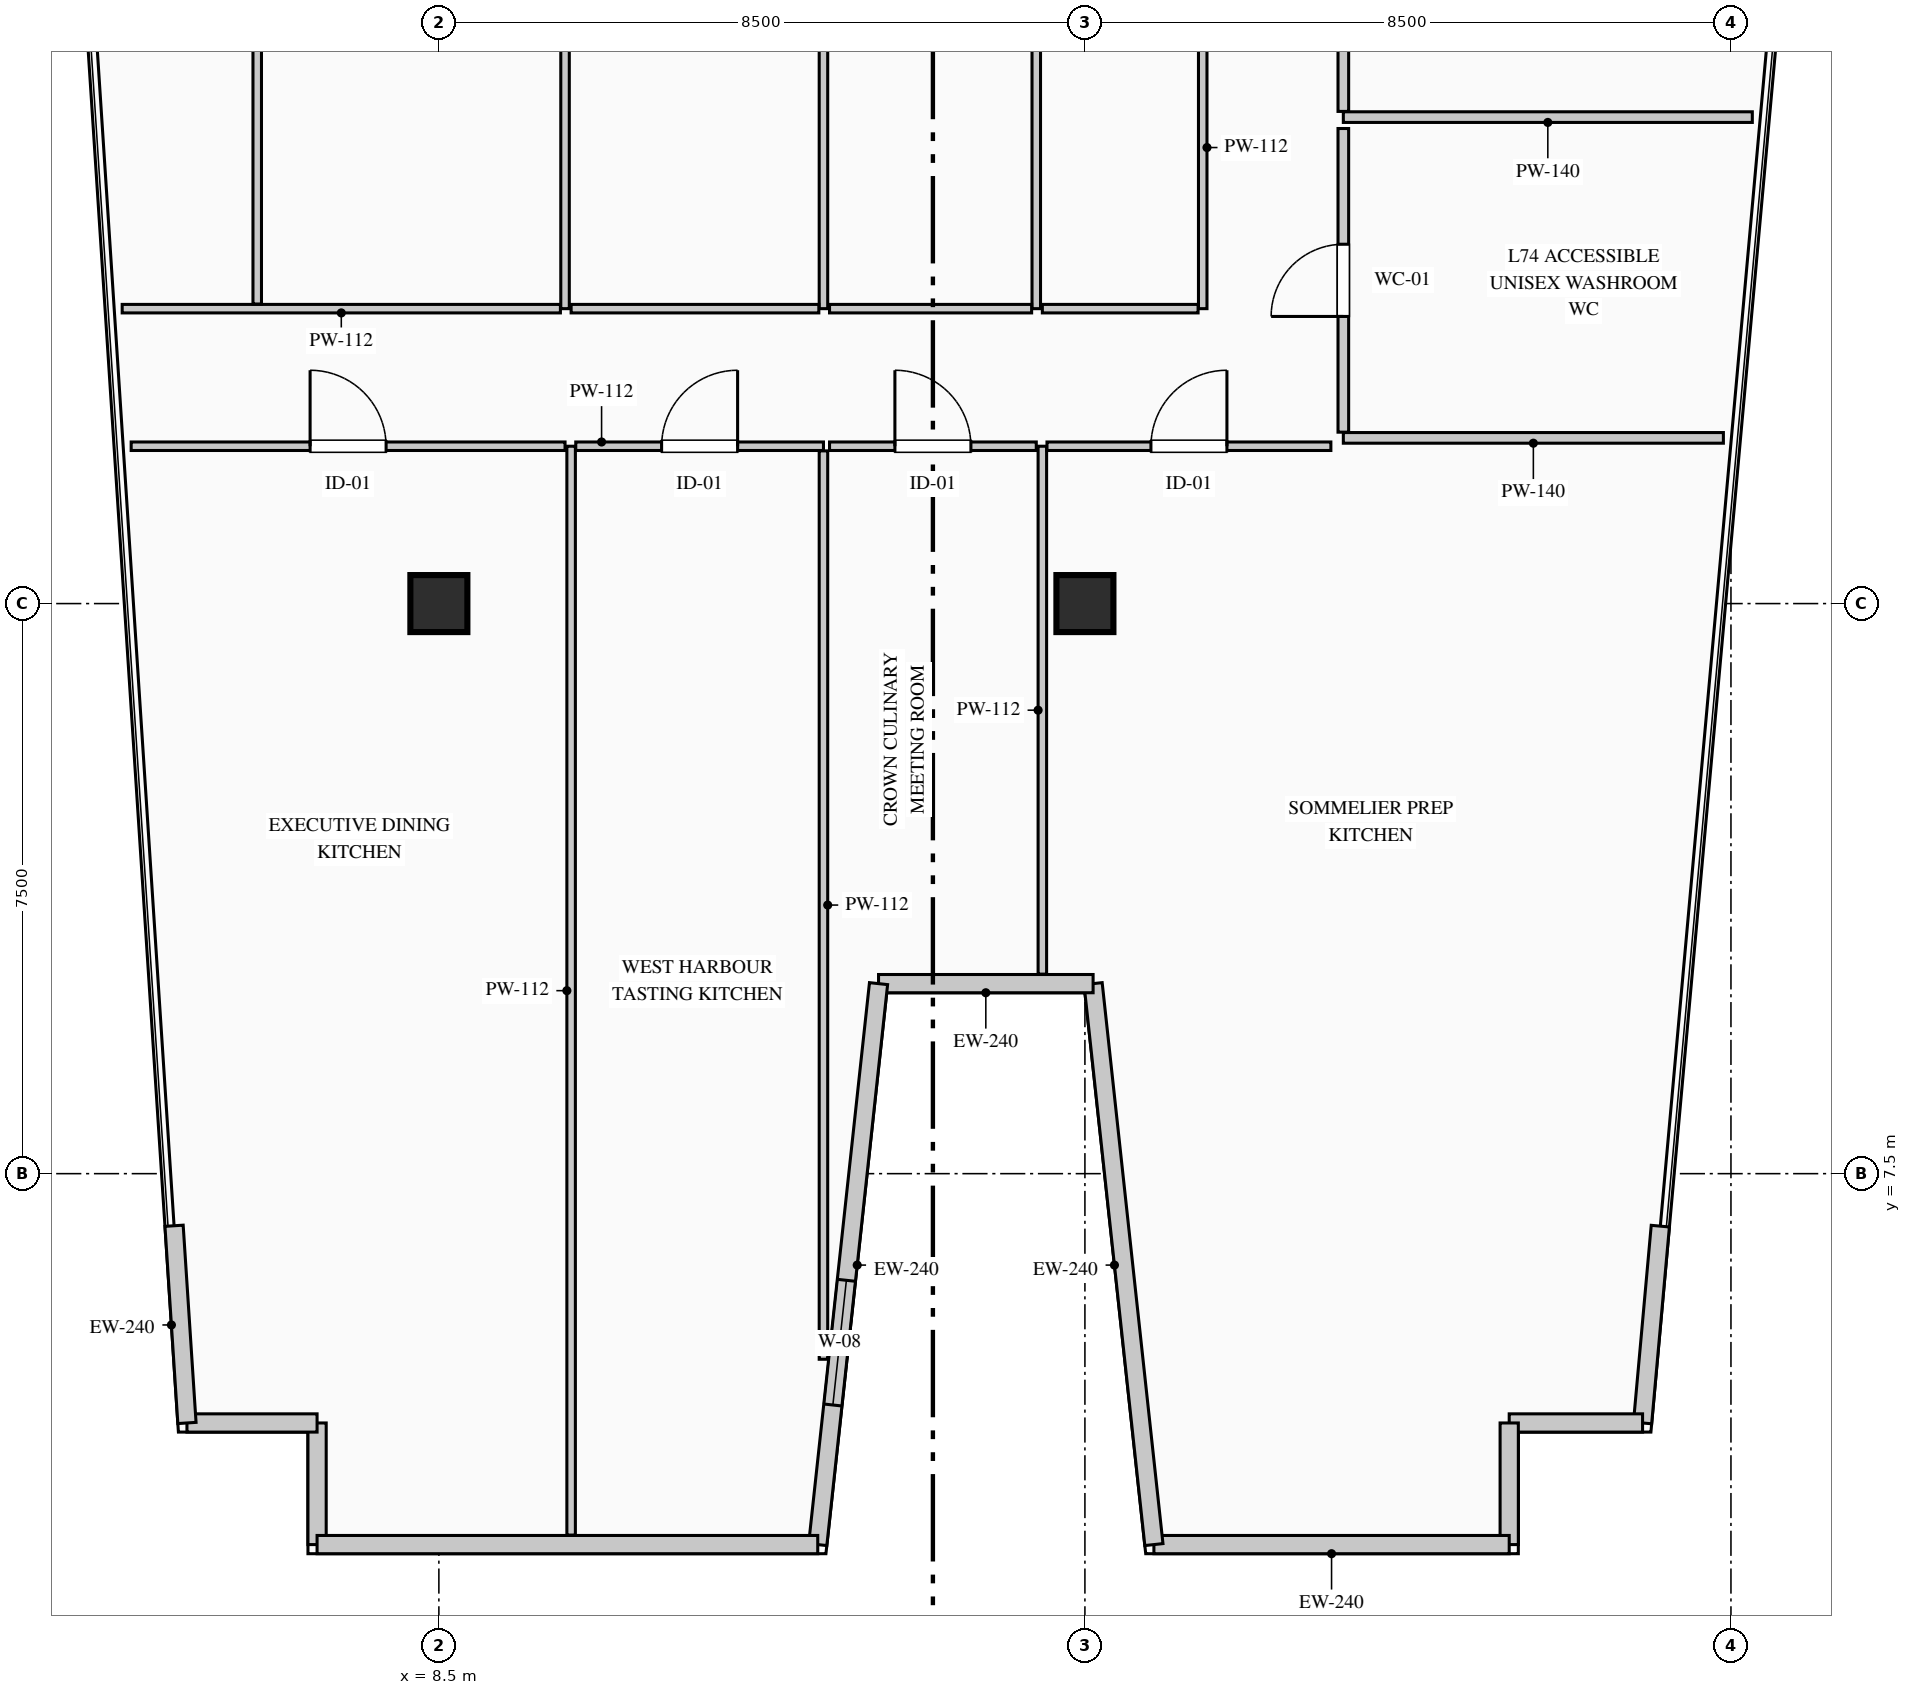
"""IFC4 building model, lengths in metres.
Left out: names, types, materials, properties, quantities, classifications, styles, units other than length and angle.
Written with IfcOpenShell. Run it as: python <this file> out.ifc"""

import sys

from ifc_helpers import new_model, si_unit, direction, frame, frame_2d, origin, origin_2d, place, context, subcontext, project, spatial, rectangle, extrude, element, fill, save


model = new_model("IFC4")
c1 = context("Model", 3, precision=1e-05, world=origin(), true_north=direction((0.0, 1.0)))
c2 = subcontext(c1, "Body", "Model", "MODEL_VIEW")
j1 = project(units=[si_unit("LENGTHUNIT", "METRE"), si_unit("PLANEANGLEUNIT", "RADIAN")], contexts=[c1])
p1 = place(None, origin())
s1 = spatial("IfcSite", under=j1, at=p1, CompositionType="ELEMENT")
p2 = place(p1, origin())
s2 = spatial("IfcBuilding", under=s1, at=p2, CompositionType="ELEMENT")
p3 = place(p2, frame((0.0, 0.0, 308.05)))
s3 = spatial("IfcBuildingStorey", under=s2, at=p3, CompositionType="ELEMENT", Elevation=308.05)
for number, where, z_axis, x_axis in (
    (1, (8.5, 15.0, 0.0), (0.0, 0.0, 1.0), (1.0, 0.0, 0.0)),
    (2, (17.0, 15.0, 0.0), (0.0, 0.0, 1.0), (1.0, 0.0, 0.0)),
):
    element("IfcColumn", number, at=place(p3, frame(where, z_axis=z_axis, x_axis=x_axis)), inside=s3, PredefinedType="COLUMN", context=c2, shape_type="SweptSolid", body=[
        extrude(rectangle(XDim=0.75, YDim=0.75, at=origin_2d()), origin(), (0.0, 0.0, 1.0), 3.95),
    ])
p4 = place(p3, frame((6.897, 2.62, 0.0), z_axis=(0.0, 0.0, 1.0), x_axis=(0.0, 1.0, 0.0)))
e3 = element("IfcWall", 3, at=p4, inside=s3, PredefinedType="STANDARD", context=c2, shape_type="SweptSolid", body=[
    extrude(rectangle(XDim=1.6, YDim=0.24, at=frame_2d((0.8, 0.0))), origin(), (0.0, 0.0, 1.0), 3.7),
])
p5 = place(p3, frame((6.897, 4.22, 0.0), z_axis=(0.0, 0.0, 1.0), x_axis=(-1.0, 0.0, 0.0)))
e4 = element("IfcWall", 4, at=p5, inside=s3, PredefinedType="STANDARD", context=c2, shape_type="SweptSolid", body=[
    extrude(rectangle(XDim=1.712, YDim=0.24, at=frame_2d((0.856, 0.0))), origin(), (0.0, 0.0, 1.0), 3.7),
])
for number, where, z_axis, x_axis in (
    (5, (5.185, 4.22, 0.0), (0.0, 0.0, 1.0), (-0.065, 0.998, 0.0)),
    (6, (24.571, 6.81, 0.0), (0.0, 0.0, 1.0), (-0.09, -0.996, 0.0)),
):
    element("IfcWall", number, at=place(p3, frame(where, z_axis=z_axis, x_axis=x_axis)), inside=s3, PredefinedType="STANDARD", context=c2, shape_type="SweptSolid", body=[
        extrude(rectangle(XDim=2.6, YDim=0.24, at=frame_2d((1.3, 0.0))), origin(), (0.0, 0.0, 1.0), 3.7),
    ])
p6 = place(p3, frame((24.337, 4.22, 0.0), z_axis=(0.0, 0.0, 1.0), x_axis=(-1.0, 0.0, 0.0)))
e7 = element("IfcWall", 7, at=p6, inside=s3, PredefinedType="STANDARD", context=c2, shape_type="SweptSolid", body=[
    extrude(rectangle(XDim=1.755, YDim=0.24, at=frame_2d((0.877, 0.0))), origin(), (0.0, 0.0, 1.0), 3.7),
])
p7 = place(p3, frame((22.583, 4.22, 0.0), z_axis=(0.0, 0.0, 1.0), x_axis=(0.0, -1.0, 0.0)))
e8 = element("IfcWall", 8, at=p7, inside=s3, PredefinedType="STANDARD", context=c2, shape_type="SweptSolid", body=[
    extrude(rectangle(XDim=1.6, YDim=0.24, at=frame_2d((0.8, 0.0))), origin(), (0.0, 0.0, 1.0), 3.7),
])
p8 = place(p3, frame((22.583, 2.62, 0.0), z_axis=(0.0, 0.0, 1.0), x_axis=(-1.0, 0.0, 0.0)))
e9 = element("IfcWall", 9, at=p8, inside=s3, PredefinedType="STANDARD", context=c2, shape_type="SweptSolid", body=[
    extrude(rectangle(XDim=4.675, YDim=0.24, at=frame_2d((2.337, 0.0))), origin(), (0.0, 0.0, 1.0), 3.7),
])
p9 = place(p3, frame((17.908, 2.62, 0.0), z_axis=(0.0, 0.0, 1.0), x_axis=(-0.107777936076, 0.994174992894, 0.0)))
e10 = element("IfcWall", 10, at=p9, inside=s3, PredefinedType="STANDARD", context=c2, shape_type="SweptSolid", body=[
    extrude(rectangle(XDim=7.423, YDim=0.24, at=frame_2d((3.711, 0.0))), origin(), (0.0, 0.0, 1.0), 3.7),
])
p10 = place(p3, frame((17.108, 10.0, 0.0), z_axis=(0.0, 0.0, 1.0), x_axis=(-1.0, 0.0, 0.0)))
e11 = element("IfcWall", 11, at=p10, inside=s3, PredefinedType="STANDARD", context=c2, shape_type="SweptSolid", body=[
    extrude(rectangle(XDim=2.823, YDim=0.24, at=frame_2d((1.411, 0.0))), origin(), (0.0, 0.0, 1.0), 3.7),
])
p11 = place(p3, frame((14.285, 10.0, 0.0), z_axis=(0.0, 0.0, 1.0), x_axis=(-0.107777936076, -0.994174992894, 0.0)))
e12 = element("IfcWall", 12, at=p11, inside=s3, PredefinedType="STANDARD", context=c2, shape_type="SweptSolid", body=[
    extrude(rectangle(XDim=7.423, YDim=0.24, at=frame_2d((3.711, 0.0))), origin(), (0.0, 0.0, 1.0), 3.7),
])
p12 = place(p11, frame((3.926, 0.0, 0.9)))
e13 = element("IfcOpeningElement", 13, at=p12, cuts=e12, PredefinedType="OPENING", context=c2, shape_type="SweptSolid", body=[
    extrude(rectangle(XDim=1.65, YDim=1.95, at=frame_2d((0.825, 0.975))), frame((0.0, 0.13, 0.0), z_axis=(0.0, -1.0, 0.0), x_axis=(1.0, 0.0, 0.0)), (0.0, 0.0, 1.0), 0.26),
])
p13 = place(p3, frame((13.485, 2.62, 0.0), z_axis=(0.0, 0.0, 1.0), x_axis=(-1.0, 0.0, 0.0)))
e14 = element("IfcWall", 14, at=p13, inside=s3, PredefinedType="STANDARD", context=c2, shape_type="SweptSolid", body=[
    extrude(rectangle(XDim=6.587, YDim=0.24, at=frame_2d((3.294, 0.0))), origin(), (0.0, 0.0, 1.0), 3.7),
])
p14 = place(p3, frame((25.781, 21.4, 0.0), z_axis=(0.0, 0.0, 1.0), x_axis=(-1.0, 0.0, 0.0)))
e15 = element("IfcWall", 15, at=p14, inside=s3, PredefinedType="PARTITIONING", context=c2, shape_type="SweptSolid", body=[
    extrude(rectangle(XDim=5.381, YDim=0.14, at=frame_2d((2.69, 0.0))), origin(), (0.0, 0.0, 1.0), 3.7),
])
p15 = place(p3, frame((20.4, 21.475, 0.0), z_axis=(0.0, 0.0, 1.0), x_axis=(0.0, 1.0, 0.0)))
e16 = element("IfcWall", 16, at=p15, inside=s3, PredefinedType="PARTITIONING", context=c2, shape_type="SweptSolid", body=[
    extrude(rectangle(XDim=3.675, YDim=0.14, at=frame_2d((1.837, 0.0))), origin(), (0.0, 0.0, 1.0), 3.7),
])
p16 = place(p15, frame((1.363, 0.0, 0.0)))
e17 = element("IfcOpeningElement", 17, at=p16, cuts=e16, PredefinedType="OPENING", context=c2, shape_type="SweptSolid", body=[
    extrude(rectangle(XDim=0.95, YDim=2.15, at=frame_2d((0.475, 1.075))), frame((0.0, 0.08, 0.0), z_axis=(0.0, -1.0, 0.0), x_axis=(1.0, 0.0, 0.0)), (0.0, 0.0, 1.0), 0.16),
])
p17 = place(p3, frame((25.4, 17.18, 0.0), z_axis=(0.0, 0.0, 1.0), x_axis=(-1.0, 0.0, 0.0)))
e18 = element("IfcWall", 18, at=p17, inside=s3, PredefinedType="PARTITIONING", context=c2, shape_type="SweptSolid", body=[
    extrude(rectangle(XDim=5.0, YDim=0.14, at=frame_2d((2.5, 0.0))), origin(), (0.0, 0.0, 1.0), 3.7),
])
p18 = place(p3, frame((20.4, 17.255, 0.0), z_axis=(0.0, 0.0, 1.0), x_axis=(0.0, 1.0, 0.0)))
e19 = element("IfcWall", 19, at=p18, inside=s3, PredefinedType="PARTITIONING", context=c2, shape_type="SweptSolid", body=[
    extrude(rectangle(XDim=3.995, YDim=0.14, at=frame_2d((1.998, 0.0))), origin(), (0.0, 0.0, 1.0), 3.7),
])
p19 = place(p18, frame((1.522, 0.0, 0.0)))
e20 = element("IfcOpeningElement", 20, at=p19, cuts=e19, PredefinedType="OPENING", context=c2, shape_type="SweptSolid", body=[
    extrude(rectangle(XDim=0.95, YDim=2.15, at=frame_2d((0.475, 1.075))), frame((0.0, 0.08, 0.0), z_axis=(0.0, -1.0, 0.0), x_axis=(1.0, 0.0, 0.0)), (0.0, 0.0, 1.0), 0.16),
])
p20 = place(p3, frame((10.24, 2.745, 0.0), z_axis=(0.0, 0.0, 1.0), x_axis=(0.0, 1.0, 0.0)))
e21 = element("IfcWall", 21, at=p20, inside=s3, PredefinedType="PARTITIONING", context=c2, shape_type="SweptSolid", body=[
    extrude(rectangle(XDim=14.325, YDim=0.112, at=frame_2d((7.163, 0.0))), origin(), (0.0, 0.0, 1.0), 3.325),
])
p21 = place(p3, frame((10.301, 17.07, 0.0), z_axis=(0.0, 0.0, 1.0), x_axis=(1.0, 0.0, 0.0)))
e22 = element("IfcWall", 22, at=p21, inside=s3, PredefinedType="PARTITIONING", context=c2, shape_type="SweptSolid", body=[
    extrude(rectangle(XDim=3.259, YDim=0.112, at=frame_2d((1.629, 0.0))), origin(), (0.0, 0.0, 1.0), 3.7),
])
p22 = place(p21, frame((1.129, 0.0, 0.0)))
e23 = element("IfcOpeningElement", 23, at=p22, cuts=e22, PredefinedType="OPENING", context=c2, shape_type="SweptSolid", body=[
    extrude(rectangle(XDim=1.0, YDim=2.15, at=frame_2d((0.5, 1.075))), frame((0.0, 0.066, 0.0), z_axis=(0.0, -1.0, 0.0), x_axis=(1.0, 0.0, 0.0)), (0.0, 0.0, 1.0), 0.132),
])
p23 = place(p3, frame((13.56, 17.009, 0.0), z_axis=(0.0, 0.0, 1.0), x_axis=(0.0, -1.0, 0.0)))
e24 = element("IfcWall", 24, at=p23, inside=s3, PredefinedType="PARTITIONING", context=c2, shape_type="SweptSolid", body=[
    extrude(rectangle(XDim=11.951, YDim=0.112, at=frame_2d((5.976, 0.0))), origin(), (0.0, 0.0, 1.0), 3.7),
])
p24 = place(p3, frame((4.451, 17.07, 0.0), z_axis=(0.0, 0.0, 1.0), x_axis=(1.0, 0.0, 0.0)))
e25 = element("IfcWall", 25, at=p24, inside=s3, PredefinedType="PARTITIONING", context=c2, shape_type="SweptSolid", body=[
    extrude(rectangle(XDim=5.708, YDim=0.112, at=frame_2d((2.854, 0.0))), origin(), (0.0, 0.0, 1.0), 3.7),
])
p25 = place(p24, frame((2.354, 0.0, 0.0)))
e26 = element("IfcOpeningElement", 26, at=p25, cuts=e25, PredefinedType="OPENING", context=c2, shape_type="SweptSolid", body=[
    extrude(rectangle(XDim=1.0, YDim=2.15, at=frame_2d((0.5, 1.075))), frame((0.0, 0.066, 0.0), z_axis=(0.0, -1.0, 0.0), x_axis=(1.0, 0.0, 0.0)), (0.0, 0.0, 1.0), 0.132),
])
p26 = place(p3, frame((16.44, 10.125, 0.0), z_axis=(0.0, 0.0, 1.0), x_axis=(0.0, 1.0, 0.0)))
e27 = element("IfcWall", 27, at=p26, inside=s3, PredefinedType="PARTITIONING", context=c2, shape_type="SweptSolid", body=[
    extrude(rectangle(XDim=6.945, YDim=0.112, at=frame_2d((3.473, 0.0))), origin(), (0.0, 0.0, 1.0), 3.7),
])
p27 = place(p3, frame((16.501, 17.07, 0.0), z_axis=(0.0, 0.0, 1.0), x_axis=(1.0, 0.0, 0.0)))
e28 = element("IfcWall", 28, at=p27, inside=s3, PredefinedType="PARTITIONING", context=c2, shape_type="SweptSolid", body=[
    extrude(rectangle(XDim=3.735, YDim=0.112, at=frame_2d((1.868, 0.0))), origin(), (0.0, 0.0, 1.0), 3.7),
])
p28 = place(p27, frame((1.367, 0.0, 0.0)))
e29 = element("IfcOpeningElement", 29, at=p28, cuts=e28, PredefinedType="OPENING", context=c2, shape_type="SweptSolid", body=[
    extrude(rectangle(XDim=1.0, YDim=2.15, at=frame_2d((0.5, 1.075))), frame((0.0, 0.066, 0.0), z_axis=(0.0, -1.0, 0.0), x_axis=(1.0, 0.0, 0.0)), (0.0, 0.0, 1.0), 0.132),
])
p29 = place(p3, frame((13.64, 17.07, 0.0), z_axis=(0.0, 0.0, 1.0), x_axis=(1.0, 0.0, 0.0)))
e30 = element("IfcWall", 30, at=p29, inside=s3, PredefinedType="PARTITIONING", context=c2, shape_type="SweptSolid", body=[
    extrude(rectangle(XDim=2.72, YDim=0.112, at=frame_2d((1.36, 0.0))), origin(), (0.0, 0.0, 1.0), 3.7),
])
p30 = place(p29, frame((0.86, 0.0, 0.0)))
e31 = element("IfcOpeningElement", 31, at=p30, cuts=e30, PredefinedType="OPENING", context=c2, shape_type="SweptSolid", body=[
    extrude(rectangle(XDim=1.0, YDim=2.15, at=frame_2d((0.5, 1.075))), frame((0.0, 0.066, 0.0), z_axis=(0.0, -1.0, 0.0), x_axis=(1.0, 0.0, 0.0)), (0.0, 0.0, 1.0), 0.132),
])
p31 = place(p3, frame((10.16, 29.259, 0.0), z_axis=(0.0, 0.0, 1.0), x_axis=(0.0, -1.0, 0.0)))
e32 = element("IfcWall", 32, at=p31, inside=s3, PredefinedType="PARTITIONING", context=c2, shape_type="SweptSolid", body=[
    extrude(rectangle(XDim=10.379, YDim=0.112, at=frame_2d((5.189, 0.0))), origin(), (0.0, 0.0, 1.0), 3.325),
])
p32 = place(p3, frame((10.099, 18.88, 0.0), z_axis=(0.0, 0.0, 1.0), x_axis=(-1.0, 0.0, 0.0)))
e33 = element("IfcWall", 33, at=p32, inside=s3, PredefinedType="PARTITIONING", context=c2, shape_type="SweptSolid", body=[
    extrude(rectangle(XDim=5.766, YDim=0.112, at=frame_2d((2.883, 0.0))), origin(), (0.0, 0.0, 1.0), 3.7),
])
p33 = place(p3, frame((6.11, 18.941, 0.0), z_axis=(0.0, 0.0, 1.0), x_axis=(0.0, 1.0, 0.0)))
e34 = element("IfcWall", 34, at=p33, inside=s3, PredefinedType="PARTITIONING", context=c2, shape_type="SweptSolid", body=[
    extrude(rectangle(XDim=10.318, YDim=0.112, at=frame_2d((5.159, 0.0))), origin(), (0.0, 0.0, 1.0), 3.7),
])
p34 = place(p33, frame((4.659, 0.0, 0.0)))
e35 = element("IfcOpeningElement", 35, at=p34, cuts=e34, PredefinedType="OPENING", context=c2, shape_type="SweptSolid", body=[
    extrude(rectangle(XDim=1.0, YDim=2.15, at=frame_2d((0.5, 1.075))), frame((0.0, 0.066, 0.0), z_axis=(0.0, -1.0, 0.0), x_axis=(1.0, 0.0, 0.0)), (0.0, 0.0, 1.0), 0.132),
])
p35 = place(p3, frame((13.56, 29.259, 0.0), z_axis=(0.0, 0.0, 1.0), x_axis=(0.0, -1.0, 0.0)))
e36 = element("IfcWall", 36, at=p35, inside=s3, PredefinedType="PARTITIONING", context=c2, shape_type="SweptSolid", body=[
    extrude(rectangle(XDim=10.379, YDim=0.112, at=frame_2d((5.189, 0.0))), origin(), (0.0, 0.0, 1.0), 3.7),
])
p36 = place(p3, frame((13.499, 18.88, 0.0), z_axis=(0.0, 0.0, 1.0), x_axis=(-1.0, 0.0, 0.0)))
e37 = element("IfcWall", 37, at=p36, inside=s3, PredefinedType="PARTITIONING", context=c2, shape_type="SweptSolid", body=[
    extrude(rectangle(XDim=3.259, YDim=0.112, at=frame_2d((1.629, 0.0))), origin(), (0.0, 0.0, 1.0), 3.7),
])
p37 = place(p3, frame((16.36, 29.259, 0.0), z_axis=(0.0, 0.0, 1.0), x_axis=(0.0, -1.0, 0.0)))
e38 = element("IfcWall", 38, at=p37, inside=s3, PredefinedType="PARTITIONING", context=c2, shape_type="SweptSolid", body=[
    extrude(rectangle(XDim=10.379, YDim=0.112, at=frame_2d((5.189, 0.0))), origin(), (0.0, 0.0, 1.0), 3.7),
])
p38 = place(p3, frame((16.299, 18.88, 0.0), z_axis=(0.0, 0.0, 1.0), x_axis=(-1.0, 0.0, 0.0)))
e39 = element("IfcWall", 39, at=p38, inside=s3, PredefinedType="PARTITIONING", context=c2, shape_type="SweptSolid", body=[
    extrude(rectangle(XDim=2.659, YDim=0.112, at=frame_2d((1.33, 0.0))), origin(), (0.0, 0.0, 1.0), 3.7),
])
p39 = place(p3, frame((18.55, 29.259, 0.0), z_axis=(0.0, 0.0, 1.0), x_axis=(0.0, -1.0, 0.0)))
e40 = element("IfcWall", 40, at=p39, inside=s3, PredefinedType="PARTITIONING", context=c2, shape_type="SweptSolid", body=[
    extrude(rectangle(XDim=10.379, YDim=0.112, at=frame_2d((5.189, 0.0))), origin(), (0.0, 0.0, 1.0), 3.7),
])
p40 = place(p39, frame((4.689, 0.0, 0.0)))
e41 = element("IfcOpeningElement", 41, at=p40, cuts=e40, PredefinedType="OPENING", context=c2, shape_type="SweptSolid", body=[
    extrude(rectangle(XDim=1.0, YDim=2.15, at=frame_2d((0.5, 1.075))), frame((0.0, 0.066, 0.0), z_axis=(0.0, -1.0, 0.0), x_axis=(1.0, 0.0, 0.0)), (0.0, 0.0, 1.0), 0.132),
])
p41 = place(p3, frame((18.489, 18.88, 0.0), z_axis=(0.0, 0.0, 1.0), x_axis=(-1.0, 0.0, 0.0)))
e42 = element("IfcWall", 42, at=p41, inside=s3, PredefinedType="PARTITIONING", context=c2, shape_type="SweptSolid", body=[
    extrude(rectangle(XDim=2.049, YDim=0.112, at=frame_2d((1.024, 0.0))), origin(), (0.0, 0.0, 1.0), 3.7),
])
p42 = place(p12, origin())
e43 = element("IfcWindow", 43, at=p42, inside=s3, PartitioningType="SINGLE_PANEL", PredefinedType="WINDOW", context=c2, shape_type="SweptSolid", body=[
    extrude(rectangle(XDim=1.65, YDim=1.95, at=frame_2d((0.825, 0.975))), frame((0.0, 0.03, 0.0), z_axis=(0.0, -1.0, 0.0), x_axis=(1.0, 0.0, 0.0)), (0.0, 0.0, 1.0), 0.06),
])
fill(e13, e43)
p43 = place(p19, origin())
e44 = element("IfcDoor", 44, at=p43, inside=s3, OperationType="SINGLE_SWING_LEFT", PredefinedType="DOOR", context=c2, shape_type="SweptSolid", body=[
    extrude(rectangle(XDim=0.95, YDim=2.15, at=frame_2d((0.475, 1.075))), frame((0.0, 0.025, 0.0), z_axis=(0.0, -1.0, 0.0), x_axis=(1.0, 0.0, 0.0)), (0.0, 0.0, 1.0), 0.05),
])
fill(e20, e44)
p44 = place(p22, origin())
e45 = element("IfcDoor", 45, at=p44, inside=s3, OperationType="SINGLE_SWING_RIGHT", PredefinedType="DOOR", context=c2, shape_type="SweptSolid", body=[
    extrude(rectangle(XDim=1.0, YDim=2.15, at=frame_2d((0.5, 1.075))), frame((0.0, 0.025, 0.0), z_axis=(0.0, -1.0, 0.0), x_axis=(1.0, 0.0, 0.0)), (0.0, 0.0, 1.0), 0.05),
])
fill(e23, e45)
p45 = place(p25, origin())
e46 = element("IfcDoor", 46, at=p45, inside=s3, OperationType="SINGLE_SWING_LEFT", PredefinedType="DOOR", context=c2, shape_type="SweptSolid", body=[
    extrude(rectangle(XDim=1.0, YDim=2.15, at=frame_2d((0.5, 1.075))), frame((0.0, 0.025, 0.0), z_axis=(0.0, -1.0, 0.0), x_axis=(1.0, 0.0, 0.0)), (0.0, 0.0, 1.0), 0.05),
])
fill(e26, e46)
p46 = place(p28, origin())
e47 = element("IfcDoor", 47, at=p46, inside=s3, OperationType="SINGLE_SWING_RIGHT", PredefinedType="DOOR", context=c2, shape_type="SweptSolid", body=[
    extrude(rectangle(XDim=1.0, YDim=2.15, at=frame_2d((0.5, 1.075))), frame((0.0, 0.025, 0.0), z_axis=(0.0, -1.0, 0.0), x_axis=(1.0, 0.0, 0.0)), (0.0, 0.0, 1.0), 0.05),
])
fill(e29, e47)
p47 = place(p30, origin())
e48 = element("IfcDoor", 48, at=p47, inside=s3, OperationType="SINGLE_SWING_LEFT", PredefinedType="DOOR", context=c2, shape_type="SweptSolid", body=[
    extrude(rectangle(XDim=1.0, YDim=2.15, at=frame_2d((0.5, 1.075))), frame((0.0, 0.025, 0.0), z_axis=(0.0, -1.0, 0.0), x_axis=(1.0, 0.0, 0.0)), (0.0, 0.0, 1.0), 0.05),
])
fill(e31, e48)
save(model, sys.argv[1])
